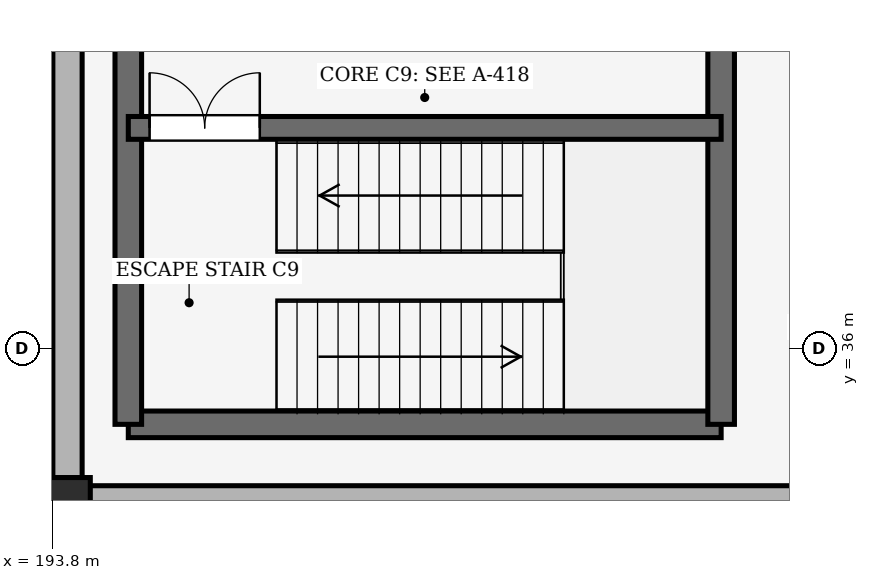
"""IFC4 building model, lengths in metres.
Left out: names, types, materials, properties, quantities, classifications, styles, units other than length and angle.
Written with IfcOpenShell. Run it as: python <this file> out.ifc"""

import sys

from ifc_helpers import new_model, si_unit, direction, frame, frame_2d, origin, origin_2d, place, context, subcontext, project, spatial, rectangle, extrude, element, fill, save


model = new_model("IFC4")
c1 = context("Model", 3, precision=1e-05, world=origin(), true_north=direction((0.0, 1.0)))
c2 = subcontext(c1, "Body", "Model", "MODEL_VIEW")
j1 = project(units=[si_unit("LENGTHUNIT", "METRE"), si_unit("PLANEANGLEUNIT", "RADIAN")], contexts=[c1])
p1 = place(None, origin())
s1 = spatial("IfcSite", under=j1, at=p1, CompositionType="ELEMENT")
p2 = place(p1, origin())
s2 = spatial("IfcBuilding", under=s1, at=p2, CompositionType="ELEMENT")
p3 = place(p2, origin())
s3 = spatial("IfcBuildingStorey", under=s2, at=p3, CompositionType="ELEMENT", Elevation=0.0)
p4 = place(p3, frame((194.0, 34.0, -0.44), z_axis=(0.0, 0.0, 1.0), x_axis=(1.0, 0.0, 0.0)))
e1 = element("IfcColumn", 1, at=p4, inside=s3, PredefinedType="COLUMN", context=c2, shape_type="SweptSolid", body=[
    extrude(rectangle(XDim=0.6, YDim=0.6, at=origin_2d()), origin(), (0.0, 0.0, 1.0), 5.84),
])
p5 = place(p3, frame((194.0, 48.0, 0.0), z_axis=(0.0, 0.0, 1.0), x_axis=(0.0, -1.0, 0.0)))
e2 = element("IfcWall", 2, at=p5, inside=s3, PredefinedType="SOLIDWALL", context=c2, shape_type="SweptSolid", body=[
    extrude(rectangle(XDim=14.0, YDim=0.385, at=frame_2d((7.0, 0.0))), origin(), (0.0, 0.0, 1.0), 4.3),
])
p6 = place(p3, frame((194.0, 34.0, 0.0), z_axis=(0.0, 0.0, 1.0), x_axis=(1.0, 0.0, 0.0)))
e3 = element("IfcWall", 3, at=p6, inside=s3, PredefinedType="SOLIDWALL", context=c2, shape_type="SweptSolid", body=[
    extrude(rectangle(XDim=10.0, YDim=0.385, at=frame_2d((5.0, 0.0))), origin(), (0.0, 0.0, 1.0), 4.3),
])
p7 = place(p3, frame((194.8, 35.0, 0.0), z_axis=(0.0, 0.0, 1.0), x_axis=(1.0, 0.0, 0.0)))
e4 = element("IfcWall", 4, at=p7, inside=s3, PredefinedType="SHEAR", context=c2, shape_type="SweptSolid", body=[
    extrude(rectangle(XDim=7.8, YDim=0.35, at=frame_2d((3.9, 0.0))), origin(), (0.0, 0.0, 1.0), 5.4),
])
for number, where, z_axis, x_axis in (
    (5, (194.8, 43.6, 0.0), (0.0, 0.0, 1.0), (0.0, -1.0, 0.0)),
    (6, (202.6, 35.0, 0.0), (0.0, 0.0, 1.0), (0.0, 1.0, 0.0)),
):
    element("IfcWall", number, at=place(p3, frame(where, z_axis=z_axis, x_axis=x_axis)), inside=s3, PredefinedType="SHEAR", context=c2, shape_type="SweptSolid", body=[
        extrude(rectangle(XDim=8.6, YDim=0.35, at=frame_2d((4.3, 0.0))), origin(), (0.0, 0.0, 1.0), 5.4),
    ])
p8 = place(p3, frame((194.8, 38.9, 0.0), z_axis=(0.0, 0.0, 1.0), x_axis=(1.0, 0.0, 0.0)))
e7 = element("IfcWall", 7, at=p8, inside=s3, PredefinedType="SHEAR", context=c2, shape_type="SweptSolid", body=[
    extrude(rectangle(XDim=7.8, YDim=0.3, at=frame_2d((3.9, 0.0))), origin(), (0.0, 0.0, 1.0), 5.4),
])
p9 = place(p8, frame((0.28, 0.0, 0.0)))
e8 = element("IfcOpeningElement", 8, at=p9, cuts=e7, PredefinedType="OPENING", context=c2, shape_type="SweptSolid", body=[
    extrude(rectangle(XDim=1.45, YDim=2.15, at=frame_2d((0.725, 1.075))), frame((0.0, 0.16, 0.0), z_axis=(0.0, -1.0, 0.0), x_axis=(1.0, 0.0, 0.0)), (0.0, 0.0, 1.0), 0.32),
])
p10 = place(p9, origin())
e9 = element("IfcDoor", 9, at=p10, inside=s3, OperationType="DOUBLE_DOOR_SINGLE_SWING", PredefinedType="DOOR", context=c2, shape_type="SweptSolid", body=[
    extrude(rectangle(XDim=1.45, YDim=2.15, at=frame_2d((0.725, 1.075))), frame((0.0, 0.025, 0.0), z_axis=(0.0, -1.0, 0.0), x_axis=(1.0, 0.0, 0.0)), (0.0, 0.0, 1.0), 0.05),
])
fill(e8, e9)
save(model, sys.argv[1])
